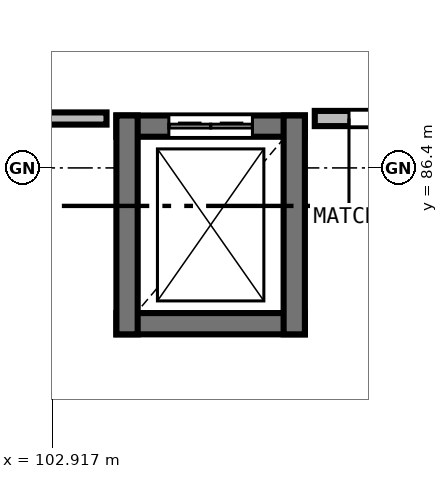
"""IFC4 building model, lengths in metres.
Left out: names, types, materials, properties, quantities, classifications, styles, units other than length and angle.
Written with IfcOpenShell. Run it as: python <this file> out.ifc"""

import sys

from ifc_helpers import new_model, si_unit, direction, frame, frame_2d, origin, place, context, subcontext, project, spatial, rectangle, extrude, element, fill, save


model = new_model("IFC4")
c1 = context("Model", 3, precision=1e-05, world=origin(), true_north=direction((0.0, 1.0)))
c2 = subcontext(c1, "Body", "Model", "MODEL_VIEW")
j1 = project(units=[si_unit("LENGTHUNIT", "METRE"), si_unit("PLANEANGLEUNIT", "RADIAN")], contexts=[c1])
p1 = place(None, origin())
s1 = spatial("IfcSite", under=j1, at=p1, CompositionType="ELEMENT")
p2 = place(p1, origin())
s2 = spatial("IfcBuilding", under=s1, at=p2, CompositionType="ELEMENT")
p3 = place(p2, frame((0.0, 0.0, 5.1)))
s3 = spatial("IfcBuildingStorey", under=s2, at=p3, CompositionType="ELEMENT", Elevation=5.1)
p4 = place(p3, frame((106.24, 84.35, 0.0), z_axis=(0.0, 0.0, 1.0), x_axis=(-1.0, 0.0, 0.0)))
e1 = element("IfcWall", 1, at=p4, inside=s3, PredefinedType="SHEAR", context=c2, shape_type="SweptSolid", body=[
    extrude(rectangle(XDim=2.48, YDim=0.28, at=frame_2d((1.24, 0.0))), origin(), (0.0, 0.0, 1.0), 3.92),
])
p5 = place(p3, frame((103.76, 86.95, 0.0), z_axis=(0.0, 0.0, 1.0), x_axis=(1.0, 0.0, 0.0)))
e2 = element("IfcWall", 2, at=p5, inside=s3, PredefinedType="SHEAR", context=c2, shape_type="SweptSolid", body=[
    extrude(rectangle(XDim=2.48, YDim=0.28, at=frame_2d((1.24, 0.0))), origin(), (0.0, 0.0, 1.0), 3.92),
])
p6 = place(p5, frame((0.69, 0.0, 0.0)))
e3 = element("IfcOpeningElement", 3, at=p6, cuts=e2, PredefinedType="OPENING", context=c2, shape_type="SweptSolid", body=[
    extrude(rectangle(XDim=1.1, YDim=2.15, at=frame_2d((0.55, 1.075))), frame((0.0, 0.15, 0.0), z_axis=(0.0, -1.0, 0.0), x_axis=(1.0, 0.0, 0.0)), (0.0, 0.0, 1.0), 0.3),
])
for number, where, z_axis, x_axis in (
    (4, (103.9, 84.21, 0.0), (0.0, 0.0, 1.0), (0.0, 1.0, 0.0)),
    (5, (106.1, 87.09, 0.0), (0.0, 0.0, 1.0), (0.0, -1.0, 0.0)),
):
    element("IfcWall", number, at=place(p3, frame(where, z_axis=z_axis, x_axis=x_axis)), inside=s3, PredefinedType="SHEAR", context=c2, shape_type="SweptSolid", body=[
        extrude(rectangle(XDim=2.88, YDim=0.28, at=frame_2d((1.44, 0.0))), origin(), (0.0, 0.0, 1.0), 3.92),
    ])
p7 = place(p3, frame((134.18, 87.05, 0.0), z_axis=(0.0, 0.0, 1.0), x_axis=(-1.0, 0.0, 0.0)))
e6 = element("IfcWall", 6, at=p7, inside=s3, PredefinedType="SOLIDWALL", context=c2, shape_type="SweptSolid", body=[
    extrude(rectangle(XDim=27.81, YDim=0.2, at=frame_2d((13.905, 0.0))), origin(), (0.0, 0.0, 1.0), 3.305),
])
p8 = place(p7, frame((26.06, 0.0, 0.0)))
e7 = element("IfcOpeningElement", 7, at=p8, cuts=e6, PredefinedType="OPENING", context=c2, shape_type="SweptSolid", body=[
    extrude(rectangle(XDim=1.3, YDim=2.15, at=frame_2d((0.65, 1.075))), frame((0.0, 0.11, 0.0), z_axis=(0.0, -1.0, 0.0), x_axis=(1.0, 0.0, 0.0)), (0.0, 0.0, 1.0), 0.22),
])
p9 = place(p3, frame((103.63, 87.05, 0.0), z_axis=(0.0, 0.0, 1.0), x_axis=(-1.0, 0.0, 0.0)))
e8 = element("IfcWall", 8, at=p9, inside=s3, PredefinedType="PARTITIONING", context=c2, shape_type="SweptSolid", body=[
    extrude(rectangle(XDim=2.83, YDim=0.16, at=frame_2d((1.415, 0.0))), origin(), (0.0, 0.0, 1.0), 3.305),
])
p10 = place(p6, origin())
e9 = element("IfcDoor", 9, at=p10, inside=s3, OperationType="DOUBLE_DOOR_SLIDING", PredefinedType="DOOR", context=c2, shape_type="SweptSolid", body=[
    extrude(rectangle(XDim=1.1, YDim=2.15, at=frame_2d((0.55, 1.075))), frame((0.0, 0.025, 0.0), z_axis=(0.0, -1.0, 0.0), x_axis=(1.0, 0.0, 0.0)), (0.0, 0.0, 1.0), 0.05),
])
fill(e3, e9)
p11 = place(p8, origin())
e10 = element("IfcDoor", 10, at=p11, inside=s3, OperationType="SINGLE_SWING_RIGHT", PredefinedType="DOOR", context=c2, shape_type="SweptSolid", body=[
    extrude(rectangle(XDim=1.3, YDim=2.15, at=frame_2d((0.65, 1.075))), frame((0.0, 0.025, 0.0), z_axis=(0.0, -1.0, 0.0), x_axis=(1.0, 0.0, 0.0)), (0.0, 0.0, 1.0), 0.05),
])
fill(e7, e10)
save(model, sys.argv[1])
